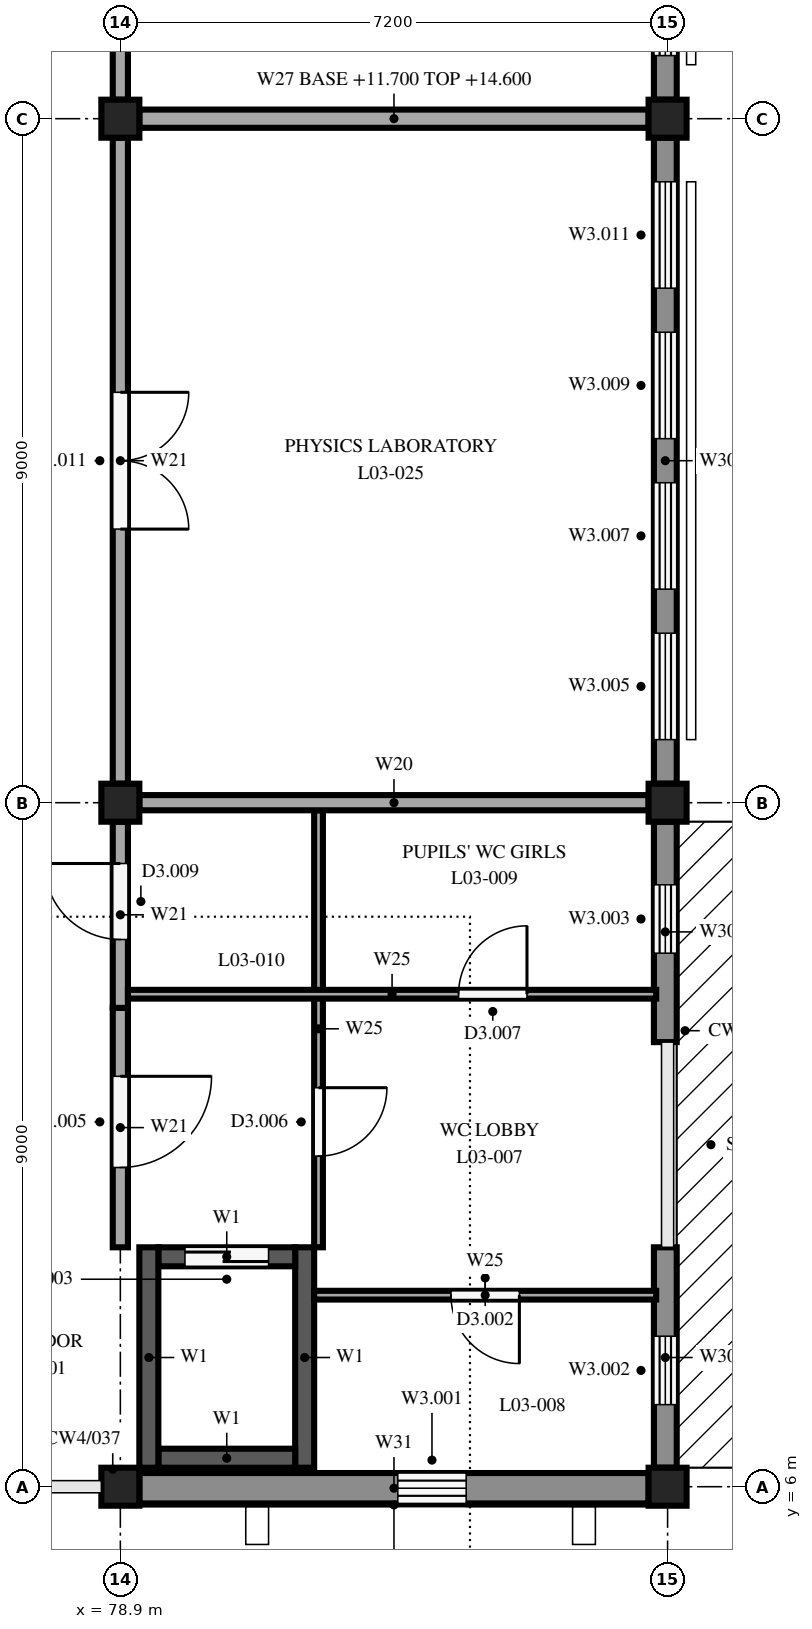
"""IFC4 building model, lengths in metres.
Left out: names, types, materials, properties, quantities, classifications, styles, units other than length and angle.
Written with IfcOpenShell. Run it as: python <this file> out.ifc"""

import sys

from ifc_helpers import new_model, si_unit, direction, frame, frame_2d, origin, origin_2d, place, context, subcontext, project, spatial, rectangle, extrude, element, fill, save


model = new_model("IFC4")
c1 = context("Model", 3, precision=1e-05, world=origin(), true_north=direction((0.0, 1.0)))
c2 = subcontext(c1, "Body", "Model", "MODEL_VIEW")
j1 = project(units=[si_unit("LENGTHUNIT", "METRE"), si_unit("PLANEANGLEUNIT", "RADIAN")], contexts=[c1])
p1 = place(None, origin())
s1 = spatial("IfcSite", under=j1, at=p1, CompositionType="ELEMENT")
p2 = place(p1, origin())
s2 = spatial("IfcBuilding", under=s1, at=p2, CompositionType="ELEMENT")
p3 = place(p2, frame((0.0, 0.0, 11.7)))
s3 = spatial("IfcBuildingStorey", under=s2, at=p3, CompositionType="ELEMENT", Elevation=11.7)
for number, where, z_axis, x_axis in (
    (1, (78.9, 6.0, 0.0), (0.0, 0.0, 1.0), (1.0, 0.0, 0.0)),
    (2, (78.9, 15.0, 0.0), (0.0, 0.0, 1.0), (1.0, 0.0, 0.0)),
    (3, (78.9, 24.0, 0.0), (0.0, 0.0, 1.0), (1.0, 0.0, 0.0)),
    (4, (86.1, 6.0, 0.0), (0.0, 0.0, 1.0), (1.0, 0.0, 0.0)),
    (5, (86.1, 15.0, 0.0), (0.0, 0.0, 1.0), (1.0, 0.0, 0.0)),
    (6, (86.1, 24.0, 0.0), (0.0, 0.0, 1.0), (1.0, 0.0, 0.0)),
):
    element("IfcColumn", number, at=place(p3, frame(where, z_axis=z_axis, x_axis=x_axis)), inside=s3, PredefinedType="COLUMN", context=c2, shape_type="SweptSolid", body=[
        extrude(rectangle(XDim=0.5, YDim=0.5, at=origin_2d()), origin(), (0.0, 0.0, 1.0), 3.35),
    ])
for number, where, z_axis, x_axis in (
    (7, (79.275, 6.25, 0.0), (0.0, 0.0, 1.0), (0.0, 1.0, 0.0)),
    (8, (81.325, 6.25, 0.0), (0.0, 0.0, 1.0), (0.0, 1.0, 0.0)),
):
    element("IfcWall", number, at=place(p3, frame(where, z_axis=z_axis, x_axis=x_axis)), inside=s3, PredefinedType="SHEAR", context=c2, shape_type="SweptSolid", body=[
        extrude(rectangle(XDim=2.9, YDim=0.25, at=frame_2d((1.45, 0.0))), origin(), (0.0, 0.0, 1.0), 3.35),
    ])
p4 = place(p3, frame((79.4, 6.375, 0.0), z_axis=(0.0, 0.0, 1.0), x_axis=(1.0, 0.0, 0.0)))
e9 = element("IfcWall", 9, at=p4, inside=s3, PredefinedType="SHEAR", context=c2, shape_type="SweptSolid", body=[
    extrude(rectangle(XDim=1.8, YDim=0.25, at=frame_2d((0.9, 0.0))), origin(), (0.0, 0.0, 1.0), 3.35),
])
p5 = place(p3, frame((79.4, 9.025, 0.0), z_axis=(0.0, 0.0, 1.0), x_axis=(1.0, 0.0, 0.0)))
e10 = element("IfcWall", 10, at=p5, inside=s3, PredefinedType="SHEAR", context=c2, shape_type="SweptSolid", body=[
    extrude(rectangle(XDim=1.8, YDim=0.25, at=frame_2d((0.9, 0.0))), origin(), (0.0, 0.0, 1.0), 3.35),
])
p6 = place(p5, frame((0.35, 0.0, 0.0)))
e11 = element("IfcOpeningElement", 11, at=p6, cuts=e10, PredefinedType="OPENING", context=c2, shape_type="SweptSolid", body=[
    extrude(rectangle(XDim=1.1, YDim=2.1, at=frame_2d((0.55, 1.05))), frame((0.0, 0.135, 0.0), z_axis=(0.0, -1.0, 0.0), x_axis=(1.0, 0.0, 0.0)), (0.0, 0.0, 1.0), 0.27),
])
p7 = place(p3, frame((86.07, 9.15, 0.0), z_axis=(0.0, 0.0, 1.0), x_axis=(0.0, -1.0, 0.0)))
e12 = element("IfcWall", 12, at=p7, inside=s3, PredefinedType="STANDARD", context=c2, shape_type="SweptSolid", body=[
    extrude(rectangle(XDim=2.9, YDim=0.3, at=frame_2d((1.45, 0.0))), origin(), (0.0, 0.0, 1.0), 2.85),
])
p8 = place(p7, frame((1.17, 0.0, 1.6)))
e13 = element("IfcOpeningElement", 13, at=p8, cuts=e12, PredefinedType="OPENING", context=c2, shape_type="SweptSolid", body=[
    extrude(rectangle(XDim=0.9, YDim=1.0, at=frame_2d((0.45, 0.5))), frame((0.0, 0.16, 0.0), z_axis=(0.0, -1.0, 0.0), x_axis=(1.0, 0.0, 0.0)), (0.0, 0.0, 1.0), 0.32),
])
p9 = place(p3, frame((86.07, 14.75, 0.0), z_axis=(0.0, 0.0, 1.0), x_axis=(0.0, -1.0, 0.0)))
e14 = element("IfcWall", 14, at=p9, inside=s3, PredefinedType="STANDARD", context=c2, shape_type="SweptSolid", body=[
    extrude(rectangle(XDim=2.9, YDim=0.3, at=frame_2d((1.45, 0.0))), origin(), (0.0, 0.0, 1.0), 2.85),
])
p10 = place(p9, frame((0.83, 0.0, 1.6)))
e15 = element("IfcOpeningElement", 15, at=p10, cuts=e14, PredefinedType="OPENING", context=c2, shape_type="SweptSolid", body=[
    extrude(rectangle(XDim=0.9, YDim=1.0, at=frame_2d((0.45, 0.5))), frame((0.0, 0.16, 0.0), z_axis=(0.0, -1.0, 0.0), x_axis=(1.0, 0.0, 0.0)), (0.0, 0.0, 1.0), 0.32),
])
p11 = place(p3, frame((86.07, 23.75, 0.0), z_axis=(0.0, 0.0, 1.0), x_axis=(0.0, -1.0, 0.0)))
e16 = element("IfcWall", 16, at=p11, inside=s3, PredefinedType="STANDARD", context=c2, shape_type="SweptSolid", body=[
    extrude(rectangle(XDim=8.5, YDim=0.3, at=frame_2d((4.25, 0.0))), origin(), (0.0, 0.0, 1.0), 2.85),
])
p12 = place(p11, frame((6.52, 0.0, 0.9)))
e17 = element("IfcOpeningElement", 17, at=p12, cuts=e16, PredefinedType="OPENING", context=c2, shape_type="SweptSolid", body=[
    extrude(rectangle(XDim=1.4, YDim=1.9, at=frame_2d((0.7, 0.95))), frame((0.0, 0.16, 0.0), z_axis=(0.0, -1.0, 0.0), x_axis=(1.0, 0.0, 0.0)), (0.0, 0.0, 1.0), 0.32),
])
p13 = place(p11, frame((4.54, 0.0, 0.9)))
e18 = element("IfcOpeningElement", 18, at=p13, cuts=e16, PredefinedType="OPENING", context=c2, shape_type="SweptSolid", body=[
    extrude(rectangle(XDim=1.4, YDim=1.9, at=frame_2d((0.7, 0.95))), frame((0.0, 0.16, 0.0), z_axis=(0.0, -1.0, 0.0), x_axis=(1.0, 0.0, 0.0)), (0.0, 0.0, 1.0), 0.32),
])
p14 = place(p11, frame((2.56, 0.0, 0.9)))
e19 = element("IfcOpeningElement", 19, at=p14, cuts=e16, PredefinedType="OPENING", context=c2, shape_type="SweptSolid", body=[
    extrude(rectangle(XDim=1.4, YDim=1.9, at=frame_2d((0.7, 0.95))), frame((0.0, 0.16, 0.0), z_axis=(0.0, -1.0, 0.0), x_axis=(1.0, 0.0, 0.0)), (0.0, 0.0, 1.0), 0.32),
])
p15 = place(p11, frame((0.58, 0.0, 0.9)))
e20 = element("IfcOpeningElement", 20, at=p15, cuts=e16, PredefinedType="OPENING", context=c2, shape_type="SweptSolid", body=[
    extrude(rectangle(XDim=1.4, YDim=1.9, at=frame_2d((0.7, 0.95))), frame((0.0, 0.16, 0.0), z_axis=(0.0, -1.0, 0.0), x_axis=(1.0, 0.0, 0.0)), (0.0, 0.0, 1.0), 0.32),
])
p16 = place(p3, frame((86.07, 32.75, 0.0), z_axis=(0.0, 0.0, 1.0), x_axis=(0.0, -1.0, 0.0)))
e21 = element("IfcWall", 21, at=p16, inside=s3, PredefinedType="STANDARD", context=c2, shape_type="SweptSolid", body=[
    extrude(rectangle(XDim=8.5, YDim=0.3, at=frame_2d((4.25, 0.0))), origin(), (0.0, 0.0, 1.0), 2.85),
])
p17 = place(p16, frame((6.52, 0.0, 0.9)))
e22 = element("IfcOpeningElement", 22, at=p17, cuts=e21, PredefinedType="OPENING", context=c2, shape_type="SweptSolid", body=[
    extrude(rectangle(XDim=1.4, YDim=1.9, at=frame_2d((0.7, 0.95))), frame((0.0, 0.16, 0.0), z_axis=(0.0, -1.0, 0.0), x_axis=(1.0, 0.0, 0.0)), (0.0, 0.0, 1.0), 0.32),
])
p18 = place(p16, frame((4.54, 0.0, 0.9)))
e23 = element("IfcOpeningElement", 23, at=p18, cuts=e21, PredefinedType="OPENING", context=c2, shape_type="SweptSolid", body=[
    extrude(rectangle(XDim=1.4, YDim=1.9, at=frame_2d((0.7, 0.95))), frame((0.0, 0.16, 0.0), z_axis=(0.0, -1.0, 0.0), x_axis=(1.0, 0.0, 0.0)), (0.0, 0.0, 1.0), 0.32),
])
p19 = place(p16, frame((2.56, 0.0, 0.9)))
e24 = element("IfcOpeningElement", 24, at=p19, cuts=e21, PredefinedType="OPENING", context=c2, shape_type="SweptSolid", body=[
    extrude(rectangle(XDim=1.4, YDim=1.9, at=frame_2d((0.7, 0.95))), frame((0.0, 0.16, 0.0), z_axis=(0.0, -1.0, 0.0), x_axis=(1.0, 0.0, 0.0)), (0.0, 0.0, 1.0), 0.32),
])
p20 = place(p16, frame((0.58, 0.0, 0.9)))
e25 = element("IfcOpeningElement", 25, at=p20, cuts=e21, PredefinedType="OPENING", context=c2, shape_type="SweptSolid", body=[
    extrude(rectangle(XDim=1.4, YDim=1.9, at=frame_2d((0.7, 0.95))), frame((0.0, 0.16, 0.0), z_axis=(0.0, -1.0, 0.0), x_axis=(1.0, 0.0, 0.0)), (0.0, 0.0, 1.0), 0.32),
])
p21 = place(p3, frame((85.85, 5.98, 0.0), z_axis=(0.0, 0.0, 1.0), x_axis=(-1.0, 0.0, 0.0)))
e26 = element("IfcWall", 26, at=p21, inside=s3, PredefinedType="STANDARD", context=c2, shape_type="SweptSolid", body=[
    extrude(rectangle(XDim=6.7, YDim=0.4, at=frame_2d((3.35, 0.0))), origin(), (0.0, 0.0, 1.0), 2.9),
])
p22 = place(p21, frame((2.4, 0.0, 1.6)))
e27 = element("IfcOpeningElement", 27, at=p22, cuts=e26, PredefinedType="OPENING", context=c2, shape_type="SweptSolid", body=[
    extrude(rectangle(XDim=0.9, YDim=1.0, at=frame_2d((0.45, 0.5))), frame((0.0, 0.21, 0.0), z_axis=(0.0, -1.0, 0.0), x_axis=(1.0, 0.0, 0.0)), (0.0, 0.0, 1.0), 0.42),
])
p23 = place(p3, frame((78.9, 12.3, 0.0), z_axis=(0.0, 0.0, 1.0), x_axis=(0.0, -1.0, 0.0)))
e28 = element("IfcWall", 28, at=p23, inside=s3, PredefinedType="PARTITIONING", context=c2, shape_type="SweptSolid", body=[
    extrude(rectangle(XDim=3.15, YDim=0.2, at=frame_2d((1.575, 0.0))), origin(), (0.0, 0.0, 1.0), 2.9),
])
p24 = place(p23, frame((0.9, 0.0, 0.0)))
e29 = element("IfcOpeningElement", 29, at=p24, cuts=e28, PredefinedType="OPENING", context=c2, shape_type="SweptSolid", body=[
    extrude(rectangle(XDim=1.2, YDim=2.1, at=frame_2d((0.6, 1.05))), frame((0.0, 0.11, 0.0), z_axis=(0.0, -1.0, 0.0), x_axis=(1.0, 0.0, 0.0)), (0.0, 0.0, 1.0), 0.22),
])
p25 = place(p3, frame((78.9, 12.3, 0.0), z_axis=(0.0, 0.0, 1.0), x_axis=(0.0, 1.0, 0.0)))
e30 = element("IfcWall", 30, at=p25, inside=s3, PredefinedType="PARTITIONING", context=c2, shape_type="SweptSolid", body=[
    extrude(rectangle(XDim=2.45, YDim=0.2, at=frame_2d((1.225, 0.0))), origin(), (0.0, 0.0, 1.0), 2.9),
])
p26 = place(p25, frame((0.9, 0.0, 0.0)))
e31 = element("IfcOpeningElement", 31, at=p26, cuts=e30, PredefinedType="OPENING", context=c2, shape_type="SweptSolid", body=[
    extrude(rectangle(XDim=1.0, YDim=2.1, at=frame_2d((0.5, 1.05))), frame((0.0, 0.11, 0.0), z_axis=(0.0, -1.0, 0.0), x_axis=(1.0, 0.0, 0.0)), (0.0, 0.0, 1.0), 0.22),
])
p27 = place(p3, frame((79.15, 15.0, 0.0), z_axis=(0.0, 0.0, 1.0), x_axis=(1.0, 0.0, 0.0)))
e32 = element("IfcWall", 32, at=p27, inside=s3, PredefinedType="PARTITIONING", context=c2, shape_type="SweptSolid", body=[
    extrude(rectangle(XDim=6.7, YDim=0.2, at=frame_2d((3.35, 0.0))), origin(), (0.0, 0.0, 1.0), 2.9),
])
p28 = place(p3, frame((81.508, 14.9, 0.0), z_axis=(0.0, 0.0, 1.0), x_axis=(0.0, -1.0, 0.0)))
e33 = element("IfcWall", 33, at=p28, inside=s3, PredefinedType="PARTITIONING", context=c2, shape_type="SweptSolid", body=[
    extrude(rectangle(XDim=5.75, YDim=0.115, at=frame_2d((2.875, 0.0))), origin(), (0.0, 0.0, 1.0), 3.35),
])
p29 = place(p28, frame((3.65, 0.0, 0.0)))
e34 = element("IfcOpeningElement", 34, at=p29, cuts=e33, PredefinedType="OPENING", context=c2, shape_type="SweptSolid", body=[
    extrude(rectangle(XDim=0.9, YDim=2.1, at=frame_2d((0.45, 1.05))), frame((0.0, 0.067, 0.0), z_axis=(0.0, -1.0, 0.0), x_axis=(1.0, 0.0, 0.0)), (0.0, 0.0, 1.0), 0.135),
])
p30 = place(p3, frame((85.95, 8.52, 0.0), z_axis=(0.0, 0.0, 1.0), x_axis=(-1.0, 0.0, 0.0)))
e35 = element("IfcWall", 35, at=p30, inside=s3, PredefinedType="PARTITIONING", context=c2, shape_type="SweptSolid", body=[
    extrude(rectangle(XDim=4.5, YDim=0.115, at=frame_2d((2.25, 0.0))), origin(), (0.0, 0.0, 1.0), 3.35),
])
p31 = place(p30, frame((1.8, 0.0, 0.0)))
e36 = element("IfcOpeningElement", 36, at=p31, cuts=e35, PredefinedType="OPENING", context=c2, shape_type="SweptSolid", body=[
    extrude(rectangle(XDim=0.9, YDim=2.1, at=frame_2d((0.45, 1.05))), frame((0.0, 0.067, 0.0), z_axis=(0.0, -1.0, 0.0), x_axis=(1.0, 0.0, 0.0)), (0.0, 0.0, 1.0), 0.135),
])
p32 = place(p3, frame((79.0, 12.48, 0.0), z_axis=(0.0, 0.0, 1.0), x_axis=(1.0, 0.0, 0.0)))
e37 = element("IfcWall", 37, at=p32, inside=s3, PredefinedType="PARTITIONING", context=c2, shape_type="SweptSolid", body=[
    extrude(rectangle(XDim=6.95, YDim=0.115, at=frame_2d((3.475, 0.0))), origin(), (0.0, 0.0, 1.0), 3.35),
])
p33 = place(p32, frame((4.35, 0.0, 0.0)))
e38 = element("IfcOpeningElement", 38, at=p33, cuts=e37, PredefinedType="OPENING", context=c2, shape_type="SweptSolid", body=[
    extrude(rectangle(XDim=0.9, YDim=2.1, at=frame_2d((0.45, 1.05))), frame((0.0, 0.067, 0.0), z_axis=(0.0, -1.0, 0.0), x_axis=(1.0, 0.0, 0.0)), (0.0, 0.0, 1.0), 0.135),
])
p34 = place(p3, frame((78.9, 23.75, 0.0), z_axis=(0.0, 0.0, 1.0), x_axis=(0.0, -1.0, 0.0)))
e39 = element("IfcWall", 39, at=p34, inside=s3, PredefinedType="PARTITIONING", context=c2, shape_type="SweptSolid", body=[
    extrude(rectangle(XDim=8.5, YDim=0.2, at=frame_2d((4.25, 0.0))), origin(), (0.0, 0.0, 1.0), 2.9),
])
p35 = place(p34, frame((3.35, 0.0, 0.0)))
e40 = element("IfcOpeningElement", 40, at=p35, cuts=e39, PredefinedType="OPENING", context=c2, shape_type="SweptSolid", body=[
    extrude(rectangle(XDim=1.8, YDim=2.1, at=frame_2d((0.9, 1.05))), frame((0.0, 0.11, 0.0), z_axis=(0.0, -1.0, 0.0), x_axis=(1.0, 0.0, 0.0)), (0.0, 0.0, 1.0), 0.22),
])
p36 = place(p3, frame((78.9, 32.75, 0.0), z_axis=(0.0, 0.0, 1.0), x_axis=(0.0, -1.0, 0.0)))
e41 = element("IfcWall", 41, at=p36, inside=s3, PredefinedType="PARTITIONING", context=c2, shape_type="SweptSolid", body=[
    extrude(rectangle(XDim=8.5, YDim=0.2, at=frame_2d((4.25, 0.0))), origin(), (0.0, 0.0, 1.0), 2.9),
])
p37 = place(p36, frame((5.985, 0.0, 0.0)))
e42 = element("IfcOpeningElement", 42, at=p37, cuts=e41, PredefinedType="OPENING", context=c2, shape_type="SweptSolid", body=[
    extrude(rectangle(XDim=0.9, YDim=2.1, at=frame_2d((0.45, 1.05))), frame((0.0, 0.11, 0.0), z_axis=(0.0, -1.0, 0.0), x_axis=(1.0, 0.0, 0.0)), (0.0, 0.0, 1.0), 0.22),
])
p38 = place(p3, frame((79.15, 24.0, 0.0), z_axis=(0.0, 0.0, 1.0), x_axis=(1.0, 0.0, 0.0)))
e43 = element("IfcWall", 43, at=p38, inside=s3, PredefinedType="PARTITIONING", context=c2, shape_type="SweptSolid", body=[
    extrude(rectangle(XDim=6.7, YDim=0.24, at=frame_2d((3.35, 0.0))), origin(), (0.0, 0.0, 1.0), 2.9),
])
p39 = place(p8, origin())
e44 = element("IfcWindow", 44, at=p39, inside=s3, PartitioningType="SINGLE_PANEL", PredefinedType="WINDOW", context=c2, shape_type="SweptSolid", body=[
    extrude(rectangle(XDim=0.9, YDim=1.0, at=frame_2d((0.45, 0.5))), frame((0.0, 0.03, 0.0), z_axis=(0.0, -1.0, 0.0), x_axis=(1.0, 0.0, 0.0)), (0.0, 0.0, 1.0), 0.06),
])
fill(e13, e44)
p40 = place(p10, origin())
e45 = element("IfcWindow", 45, at=p40, inside=s3, PartitioningType="SINGLE_PANEL", PredefinedType="WINDOW", context=c2, shape_type="SweptSolid", body=[
    extrude(rectangle(XDim=0.9, YDim=1.0, at=frame_2d((0.45, 0.5))), frame((0.0, 0.03, 0.0), z_axis=(0.0, -1.0, 0.0), x_axis=(1.0, 0.0, 0.0)), (0.0, 0.0, 1.0), 0.06),
])
fill(e15, e45)
p41 = place(p12, origin())
e46 = element("IfcWindow", 46, at=p41, inside=s3, PartitioningType="DOUBLE_PANEL_VERTICAL", PredefinedType="WINDOW", context=c2, shape_type="SweptSolid", body=[
    extrude(rectangle(XDim=1.4, YDim=1.9, at=frame_2d((0.7, 0.95))), frame((0.0, 0.03, 0.0), z_axis=(0.0, -1.0, 0.0), x_axis=(1.0, 0.0, 0.0)), (0.0, 0.0, 1.0), 0.06),
])
fill(e17, e46)
p42 = place(p13, origin())
e47 = element("IfcWindow", 47, at=p42, inside=s3, PartitioningType="DOUBLE_PANEL_VERTICAL", PredefinedType="WINDOW", context=c2, shape_type="SweptSolid", body=[
    extrude(rectangle(XDim=1.4, YDim=1.9, at=frame_2d((0.7, 0.95))), frame((0.0, 0.03, 0.0), z_axis=(0.0, -1.0, 0.0), x_axis=(1.0, 0.0, 0.0)), (0.0, 0.0, 1.0), 0.06),
])
fill(e18, e47)
p43 = place(p14, origin())
e48 = element("IfcWindow", 48, at=p43, inside=s3, PartitioningType="DOUBLE_PANEL_VERTICAL", PredefinedType="WINDOW", context=c2, shape_type="SweptSolid", body=[
    extrude(rectangle(XDim=1.4, YDim=1.9, at=frame_2d((0.7, 0.95))), frame((0.0, 0.03, 0.0), z_axis=(0.0, -1.0, 0.0), x_axis=(1.0, 0.0, 0.0)), (0.0, 0.0, 1.0), 0.06),
])
fill(e19, e48)
p44 = place(p15, origin())
e49 = element("IfcWindow", 49, at=p44, inside=s3, PartitioningType="DOUBLE_PANEL_VERTICAL", PredefinedType="WINDOW", context=c2, shape_type="SweptSolid", body=[
    extrude(rectangle(XDim=1.4, YDim=1.9, at=frame_2d((0.7, 0.95))), frame((0.0, 0.03, 0.0), z_axis=(0.0, -1.0, 0.0), x_axis=(1.0, 0.0, 0.0)), (0.0, 0.0, 1.0), 0.06),
])
fill(e20, e49)
p45 = place(p17, origin())
e50 = element("IfcWindow", 50, at=p45, inside=s3, PartitioningType="DOUBLE_PANEL_VERTICAL", PredefinedType="WINDOW", context=c2, shape_type="SweptSolid", body=[
    extrude(rectangle(XDim=1.4, YDim=1.9, at=frame_2d((0.7, 0.95))), frame((0.0, 0.03, 0.0), z_axis=(0.0, -1.0, 0.0), x_axis=(1.0, 0.0, 0.0)), (0.0, 0.0, 1.0), 0.06),
])
fill(e22, e50)
p46 = place(p22, origin())
e51 = element("IfcWindow", 51, at=p46, inside=s3, PartitioningType="SINGLE_PANEL", PredefinedType="WINDOW", context=c2, shape_type="SweptSolid", body=[
    extrude(rectangle(XDim=0.9, YDim=1.0, at=frame_2d((0.45, 0.5))), frame((0.0, 0.03, 0.0), z_axis=(0.0, -1.0, 0.0), x_axis=(1.0, 0.0, 0.0)), (0.0, 0.0, 1.0), 0.06),
])
fill(e27, e51)
p47 = place(p24, origin())
e52 = element("IfcDoor", 52, at=p47, inside=s3, OperationType="SINGLE_SWING_LEFT", PredefinedType="DOOR", context=c2, shape_type="SweptSolid", body=[
    extrude(rectangle(XDim=1.2, YDim=2.1, at=frame_2d((0.6, 1.05))), frame((0.0, 0.025, 0.0), z_axis=(0.0, -1.0, 0.0), x_axis=(1.0, 0.0, 0.0)), (0.0, 0.0, 1.0), 0.05),
])
fill(e29, e52)
p48 = place(p26, origin())
e53 = element("IfcDoor", 53, at=p48, inside=s3, OperationType="SINGLE_SWING_RIGHT", PredefinedType="DOOR", context=c2, shape_type="SweptSolid", body=[
    extrude(rectangle(XDim=1.0, YDim=2.1, at=frame_2d((0.5, 1.05))), frame((0.0, 0.025, 0.0), z_axis=(0.0, -1.0, 0.0), x_axis=(1.0, 0.0, 0.0)), (0.0, 0.0, 1.0), 0.05),
])
fill(e31, e53)
p49 = place(p29, origin())
e54 = element("IfcDoor", 54, at=p49, inside=s3, OperationType="SINGLE_SWING_LEFT", PredefinedType="DOOR", context=c2, shape_type="SweptSolid", body=[
    extrude(rectangle(XDim=0.9, YDim=2.1, at=frame_2d((0.45, 1.05))), frame((0.0, 0.025, 0.0), z_axis=(0.0, -1.0, 0.0), x_axis=(1.0, 0.0, 0.0)), (0.0, 0.0, 1.0), 0.05),
])
fill(e34, e54)
p50 = place(p31, origin())
e55 = element("IfcDoor", 55, at=p50, inside=s3, OperationType="SINGLE_SWING_LEFT", PredefinedType="DOOR", context=c2, shape_type="SweptSolid", body=[
    extrude(rectangle(XDim=0.9, YDim=2.1, at=frame_2d((0.45, 1.05))), frame((0.0, 0.025, 0.0), z_axis=(0.0, -1.0, 0.0), x_axis=(1.0, 0.0, 0.0)), (0.0, 0.0, 1.0), 0.05),
])
fill(e36, e55)
p51 = place(p33, origin())
e56 = element("IfcDoor", 56, at=p51, inside=s3, OperationType="SINGLE_SWING_RIGHT", PredefinedType="DOOR", context=c2, shape_type="SweptSolid", body=[
    extrude(rectangle(XDim=0.9, YDim=2.1, at=frame_2d((0.45, 1.05))), frame((0.0, 0.025, 0.0), z_axis=(0.0, -1.0, 0.0), x_axis=(1.0, 0.0, 0.0)), (0.0, 0.0, 1.0), 0.05),
])
fill(e38, e56)
p52 = place(p35, origin())
e57 = element("IfcDoor", 57, at=p52, inside=s3, OperationType="DOUBLE_DOOR_DOUBLE_SWING", PredefinedType="DOOR", context=c2, shape_type="SweptSolid", body=[
    extrude(rectangle(XDim=1.8, YDim=2.1, at=frame_2d((0.9, 1.05))), frame((0.0, 0.025, 0.0), z_axis=(0.0, -1.0, 0.0), x_axis=(1.0, 0.0, 0.0)), (0.0, 0.0, 1.0), 0.05),
])
fill(e40, e57)
p53 = place(p6, origin())
e58 = element("IfcDoor", 58, at=p53, inside=s3, OperationType="SLIDING_TO_LEFT", PredefinedType="DOOR", context=c2, shape_type="SweptSolid", body=[
    extrude(rectangle(XDim=1.1, YDim=2.1, at=frame_2d((0.55, 1.05))), frame((0.0, 0.025, 0.0), z_axis=(0.0, -1.0, 0.0), x_axis=(1.0, 0.0, 0.0)), (0.0, 0.0, 1.0), 0.05),
])
fill(e11, e58)
save(model, sys.argv[1])
